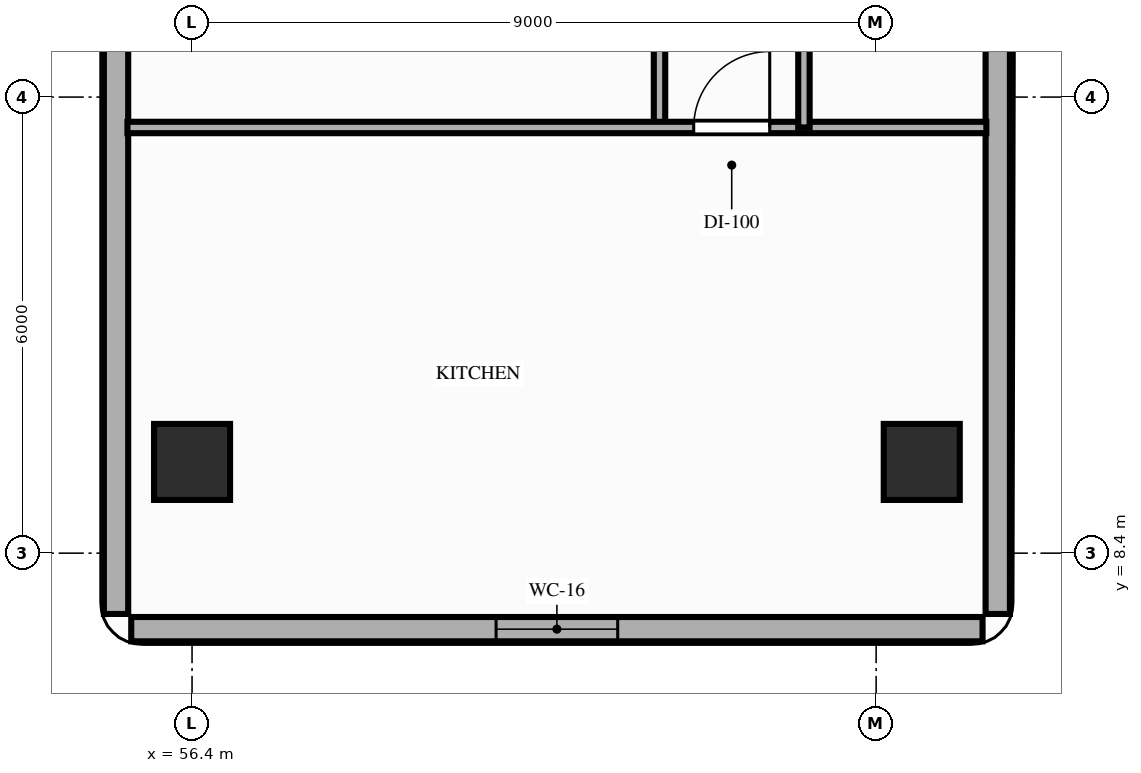
"""IFC4 building model, lengths in metres.
Left out: names, types, materials, properties, quantities, classifications, styles, units other than length and angle.
Written with IfcOpenShell. Run it as: python <this file> out.ifc"""

import sys

from ifc_helpers import new_model, si_unit, direction, frame, frame_2d, origin, origin_2d, place, context, subcontext, project, spatial, rectangle, extrude, element, fill, save


model = new_model("IFC4")
c1 = context("Model", 3, precision=1e-05, world=origin(), true_north=direction((0.0, 1.0)))
c2 = subcontext(c1, "Body", "Model", "MODEL_VIEW")
j1 = project(units=[si_unit("LENGTHUNIT", "METRE"), si_unit("PLANEANGLEUNIT", "RADIAN")], contexts=[c1])
p1 = place(None, origin())
s1 = spatial("IfcSite", under=j1, at=p1, CompositionType="ELEMENT")
p2 = place(p1, origin())
s2 = spatial("IfcBuilding", under=s1, at=p2, CompositionType="ELEMENT")
p3 = place(p2, frame((0.0, 0.0, 36.6)))
s3 = spatial("IfcBuildingStorey", under=s2, at=p3, CompositionType="ELEMENT", Elevation=36.6)
for number, where, z_axis, x_axis in (
    (1, (56.4, 9.6, 0.0), (0.0, 0.0, 1.0), (1.0, 0.0, 0.0)),
    (2, (66.0, 9.6, 0.0), (0.0, 0.0, 1.0), (1.0, 0.0, 0.0)),
):
    element("IfcColumn", number, at=place(p3, frame(where, z_axis=z_axis, x_axis=x_axis)), inside=s3, PredefinedType="COLUMN", context=c2, shape_type="SweptSolid", body=[
        extrude(rectangle(XDim=1.0, YDim=1.0, at=origin_2d()), origin(), (0.0, 0.0, 1.0), 3.2),
    ])
p4 = place(p3, frame((55.6, 7.4, 0.0), z_axis=(0.0, 0.0, 1.0), x_axis=(1.0, 0.0, 0.0)))
e3 = element("IfcWall", 3, at=p4, inside=s3, PredefinedType="STANDARD", context=c2, shape_type="SweptSolid", body=[
    extrude(rectangle(XDim=11.2, YDim=0.32, at=frame_2d((5.6, 0.0))), origin(), (0.0, 0.0, 1.0), 2.96),
])
p5 = place(p4, frame((4.8, 0.0, 0.85)))
e4 = element("IfcOpeningElement", 4, at=p5, cuts=e3, PredefinedType="OPENING", context=c2, shape_type="SweptSolid", body=[
    extrude(rectangle(XDim=1.6, YDim=1.7, at=frame_2d((0.8, 0.85))), frame((0.0, 0.17, 0.0), z_axis=(0.0, -1.0, 0.0), x_axis=(1.0, 0.0, 0.0)), (0.0, 0.0, 1.0), 0.34),
])
for number, where, z_axis, x_axis in (
    (5, (55.4, 20.4, 0.0), (0.0, 0.0, 1.0), (0.0, -1.0, 0.0)),
    (6, (67.0, 7.6, 0.0), (0.0, 0.0, 1.0), (0.0, 1.0, 0.0)),
):
    element("IfcWall", number, at=place(p3, frame(where, z_axis=z_axis, x_axis=x_axis)), inside=s3, PredefinedType="STANDARD", context=c2, shape_type="SweptSolid", body=[
        extrude(rectangle(XDim=12.8, YDim=0.32, at=frame_2d((6.4, 0.0))), origin(), (0.0, 0.0, 1.0), 2.96),
    ])
p6 = place(p3, frame((62.55, 14.0, 0.0), z_axis=(0.0, 0.0, 1.0), x_axis=(0.0, 1.0, 0.0)))
e7 = element("IfcWall", 7, at=p6, inside=s3, PredefinedType="PARTITIONING", context=c2, shape_type="SweptSolid", body=[
    extrude(rectangle(XDim=6.75, YDim=0.15, at=frame_2d((3.375, 0.0))), origin(), (0.0, 0.0, 1.0), 2.45),
])
p7 = place(p6, frame((2.6, 0.0, 0.0)))
e8 = element("IfcOpeningElement", 8, at=p7, cuts=e7, PredefinedType="OPENING", context=c2, shape_type="SweptSolid", body=[
    extrude(rectangle(XDim=0.95, YDim=2.15, at=frame_2d((0.475, 1.075))), frame((0.0, 0.085, 0.0), z_axis=(0.0, -1.0, 0.0), x_axis=(1.0, 0.0, 0.0)), (0.0, 0.0, 1.0), 0.17),
])
p8 = place(p3, frame((55.55, 14.0, 0.0), z_axis=(0.0, 0.0, 1.0), x_axis=(1.0, 0.0, 0.0)))
e9 = element("IfcWall", 9, at=p8, inside=s3, PredefinedType="PARTITIONING", context=c2, shape_type="SweptSolid", body=[
    extrude(rectangle(XDim=11.3, YDim=0.15, at=frame_2d((5.65, 0.0))), origin(), (0.0, 0.0, 1.0), 2.45),
])
p9 = place(p8, frame((7.45, 0.0, 0.0)))
e10 = element("IfcOpeningElement", 10, at=p9, cuts=e9, PredefinedType="OPENING", context=c2, shape_type="SweptSolid", body=[
    extrude(rectangle(XDim=1.0, YDim=2.15, at=frame_2d((0.5, 1.075))), frame((0.0, 0.085, 0.0), z_axis=(0.0, -1.0, 0.0), x_axis=(1.0, 0.0, 0.0)), (0.0, 0.0, 1.0), 0.17),
])
p10 = place(p3, frame((64.45, 14.0, 0.0), z_axis=(0.0, 0.0, 1.0), x_axis=(0.0, 1.0, 0.0)))
e11 = element("IfcWall", 11, at=p10, inside=s3, PredefinedType="PARTITIONING", context=c2, shape_type="SweptSolid", body=[
    extrude(rectangle(XDim=6.75, YDim=0.15, at=frame_2d((3.375, 0.0))), origin(), (0.0, 0.0, 1.0), 2.45),
])
p11 = place(p10, frame((3.24, 0.0, 0.0)))
e12 = element("IfcOpeningElement", 12, at=p11, cuts=e11, PredefinedType="OPENING", context=c2, shape_type="SweptSolid", body=[
    extrude(rectangle(XDim=0.95, YDim=2.15, at=frame_2d((0.475, 1.075))), frame((0.0, 0.085, 0.0), z_axis=(0.0, -1.0, 0.0), x_axis=(1.0, 0.0, 0.0)), (0.0, 0.0, 1.0), 0.17),
])
p12 = place(p5, origin())
e13 = element("IfcWindow", 13, at=p12, inside=s3, PartitioningType="SINGLE_PANEL", PredefinedType="WINDOW", context=c2, shape_type="SweptSolid", body=[
    extrude(rectangle(XDim=1.6, YDim=1.7, at=frame_2d((0.8, 0.85))), frame((0.0, 0.03, 0.0), z_axis=(0.0, -1.0, 0.0), x_axis=(1.0, 0.0, 0.0)), (0.0, 0.0, 1.0), 0.06),
])
fill(e4, e13)
p13 = place(p9, origin())
e14 = element("IfcDoor", 14, at=p13, inside=s3, OperationType="SINGLE_SWING_RIGHT", PredefinedType="DOOR", context=c2, shape_type="SweptSolid", body=[
    extrude(rectangle(XDim=1.0, YDim=2.15, at=frame_2d((0.5, 1.075))), frame((0.0, 0.025, 0.0), z_axis=(0.0, -1.0, 0.0), x_axis=(1.0, 0.0, 0.0)), (0.0, 0.0, 1.0), 0.05),
])
fill(e10, e14)
save(model, sys.argv[1])
